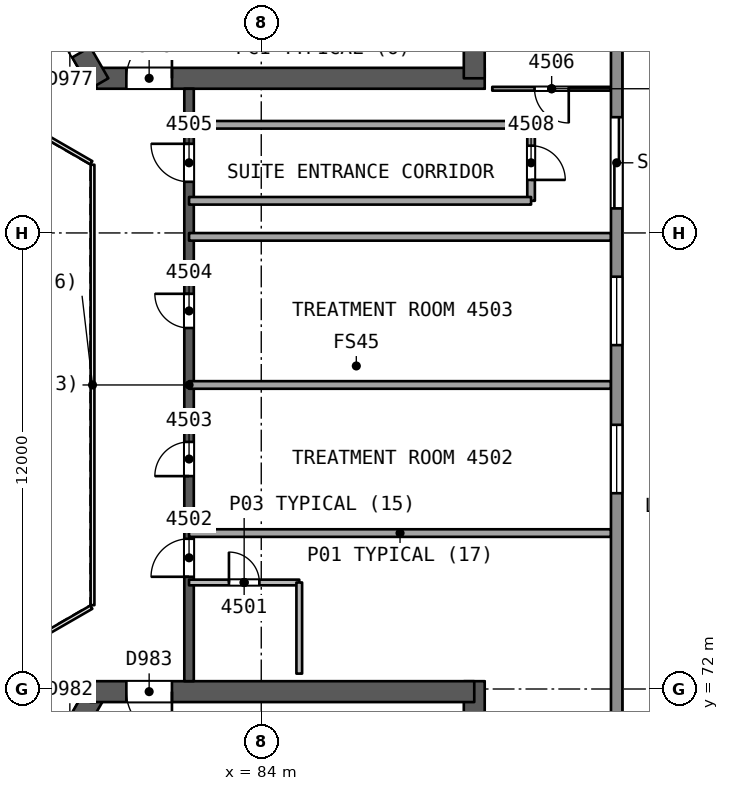
"""IFC4 building model, lengths in metres.
Left out: names, types, materials, properties, quantities, classifications, styles, units other than length and angle.
Written with IfcOpenShell. Run it as: python <this file> out.ifc"""

import sys

from ifc_helpers import new_model, si_unit, direction, frame, frame_2d, origin, place, context, subcontext, project, spatial, rectangle, extrude, element, fill, save


model = new_model("IFC4")
c1 = context("Model", 3, precision=1e-05, world=origin(), true_north=direction((0.0, 1.0)))
c2 = subcontext(c1, "Body", "Model", "MODEL_VIEW")
j1 = project(units=[si_unit("LENGTHUNIT", "METRE"), si_unit("PLANEANGLEUNIT", "RADIAN")], contexts=[c1])
p1 = place(None, origin())
s1 = spatial("IfcSite", under=j1, at=p1, CompositionType="ELEMENT")
p2 = place(p1, origin())
s2 = spatial("IfcBuilding", under=s1, at=p2, CompositionType="ELEMENT")
p3 = place(p2, frame((0.0, 0.0, 185.9)))
s3 = spatial("IfcBuildingStorey", under=s2, at=p3, CompositionType="ELEMENT", Elevation=185.9)
p4 = place(p3, frame((79.659, 88.069, 0.0), z_axis=(0.0, 0.0, 1.0), x_axis=(1.0, 0.0, 0.0)))
e1 = element("IfcWall", 1, at=p4, inside=s3, PredefinedType="SHEAR", context=c2, shape_type="SweptSolid", body=[
    extrude(rectangle(XDim=10.221, YDim=0.55, at=frame_2d((5.111, 0.0))), origin(), (0.0, 0.0, 1.0), 3.7),
])
p5 = place(p4, frame((0.791, 0.0, 0.0)))
e2 = element("IfcOpeningElement", 2, at=p5, cuts=e1, PredefinedType="OPENING", context=c2, shape_type="SweptSolid", body=[
    extrude(rectangle(XDim=1.2, YDim=2.1, at=frame_2d((0.6, 1.05))), frame((0.0, 0.286, 0.0), z_axis=(0.0, -1.0, 0.0), x_axis=(1.0, 0.0, 0.0)), (0.0, 0.0, 1.0), 0.571),
])
p6 = place(p3, frame((89.605, 88.069, 0.0), z_axis=(0.0, 0.0, 1.0), x_axis=(0.0, 1.0, 0.0)))
e3 = element("IfcWall", 3, at=p6, inside=s3, PredefinedType="SHEAR", context=c2, shape_type="SweptSolid", body=[
    extrude(rectangle(XDim=14.058, YDim=0.55, at=frame_2d((7.029, 0.0))), origin(), (0.0, 0.0, 1.0), 3.7),
])
p7 = place(p3, frame((74.686, 96.683, 0.0), z_axis=(0.0, 0.0, 1.0), x_axis=(0.499997818338, -0.866026663364, 0.0)))
e4 = element("IfcWall", 4, at=p7, inside=s3, PredefinedType="SHEAR", context=c2, shape_type="SweptSolid", body=[
    extrude(rectangle(XDim=10.105, YDim=0.55, at=frame_2d((5.052, 0.0))), origin(), (0.0, 0.0, 1.0), 3.7),
])
p8 = place(p7, frame((7.955, 0.0, 0.0)))
e5 = element("IfcOpeningElement", 5, at=p8, cuts=e4, PredefinedType="OPENING", context=c2, shape_type="SweptSolid", body=[
    extrude(rectangle(XDim=1.2, YDim=2.1, at=frame_2d((0.6, 1.05))), frame((0.0, 0.286, 0.0), z_axis=(0.0, -1.0, 0.0), x_axis=(1.0, 0.0, 0.0)), (0.0, 0.0, 1.0), 0.571),
])
p9 = place(p3, frame((79.659, 71.931, 0.0), z_axis=(0.0, 0.0, 1.0), x_axis=(-0.500000202252, -0.866025287014, 0.0)))
e6 = element("IfcWall", 6, at=p9, inside=s3, PredefinedType="SHEAR", context=c2, shape_type="SweptSolid", body=[
    extrude(rectangle(XDim=10.221, YDim=0.55, at=frame_2d((5.111, 0.0))), origin(), (0.0, 0.0, 1.0), 3.7),
])
p10 = place(p9, frame((0.791, 0.0, 0.0)))
e7 = element("IfcOpeningElement", 7, at=p10, cuts=e6, PredefinedType="OPENING", context=c2, shape_type="SweptSolid", body=[
    extrude(rectangle(XDim=1.2, YDim=2.1, at=frame_2d((0.6, 1.05))), frame((0.0, 0.286, 0.0), z_axis=(0.0, -1.0, 0.0), x_axis=(1.0, 0.0, 0.0)), (0.0, 0.0, 1.0), 0.571),
])
p11 = place(p3, frame((89.605, 58.031, 0.0), z_axis=(0.0, 0.0, 1.0), x_axis=(0.0, 1.0, 0.0)))
e8 = element("IfcWall", 8, at=p11, inside=s3, PredefinedType="SHEAR", context=c2, shape_type="SweptSolid", body=[
    extrude(rectangle(XDim=14.175, YDim=0.55, at=frame_2d((7.087, 0.0))), origin(), (0.0, 0.0, 1.0), 3.7),
])
p12 = place(p3, frame((89.605, 71.931, 0.0), z_axis=(0.0, 0.0, 1.0), x_axis=(-1.0, 0.0, 0.0)))
e9 = element("IfcWall", 9, at=p12, inside=s3, PredefinedType="SHEAR", context=c2, shape_type="SweptSolid", body=[
    extrude(rectangle(XDim=10.105, YDim=0.55, at=frame_2d((5.052, 0.0))), origin(), (0.0, 0.0, 1.0), 3.7),
])
p13 = place(p12, frame((7.955, 0.0, 0.0)))
e10 = element("IfcOpeningElement", 10, at=p13, cuts=e9, PredefinedType="OPENING", context=c2, shape_type="SweptSolid", body=[
    extrude(rectangle(XDim=1.2, YDim=2.1, at=frame_2d((0.6, 1.05))), frame((0.0, 0.286, 0.0), z_axis=(0.0, -1.0, 0.0), x_axis=(1.0, 0.0, 0.0)), (0.0, 0.0, 1.0), 0.571),
])
p14 = place(p3, frame((82.1, 72.206, 0.0), z_axis=(0.0, 0.0, 1.0), x_axis=(0.0, 1.0, 0.0)))
e11 = element("IfcWall", 11, at=p14, inside=s3, PredefinedType="SHEAR", context=c2, shape_type="SweptSolid", body=[
    extrude(rectangle(XDim=15.588, YDim=0.25, at=frame_2d((7.794, 0.0))), origin(), (0.0, 0.0, 1.0), 3.25),
])
p15 = place(p14, frame((2.747, 0.0, 0.0)))
e12 = element("IfcOpeningElement", 12, at=p15, cuts=e11, PredefinedType="OPENING", context=c2, shape_type="SweptSolid", body=[
    extrude(rectangle(XDim=1.0, YDim=2.1, at=frame_2d((0.5, 1.05))), frame((0.0, 0.135, 0.0), z_axis=(0.0, -1.0, 0.0), x_axis=(1.0, 0.0, 0.0)), (0.0, 0.0, 1.0), 0.271),
])
p16 = place(p14, frame((5.396, 0.0, 0.0)))
e13 = element("IfcOpeningElement", 13, at=p16, cuts=e11, PredefinedType="OPENING", context=c2, shape_type="SweptSolid", body=[
    extrude(rectangle(XDim=0.9, YDim=2.1, at=frame_2d((0.45, 1.05))), frame((0.0, 0.135, 0.0), z_axis=(0.0, -1.0, 0.0), x_axis=(1.0, 0.0, 0.0)), (0.0, 0.0, 1.0), 0.271),
])
p17 = place(p14, frame((9.293, 0.0, 0.0)))
e14 = element("IfcOpeningElement", 14, at=p17, cuts=e11, PredefinedType="OPENING", context=c2, shape_type="SweptSolid", body=[
    extrude(rectangle(XDim=0.9, YDim=2.1, at=frame_2d((0.45, 1.05))), frame((0.0, 0.135, 0.0), z_axis=(0.0, -1.0, 0.0), x_axis=(1.0, 0.0, 0.0)), (0.0, 0.0, 1.0), 0.271),
])
p18 = place(p14, frame((13.14, 0.0, 0.0)))
e15 = element("IfcOpeningElement", 15, at=p18, cuts=e11, PredefinedType="OPENING", context=c2, shape_type="SweptSolid", body=[
    extrude(rectangle(XDim=1.0, YDim=2.1, at=frame_2d((0.5, 1.05))), frame((0.0, 0.135, 0.0), z_axis=(0.0, -1.0, 0.0), x_axis=(1.0, 0.0, 0.0)), (0.0, 0.0, 1.0), 0.271),
])
p19 = place(p3, frame((82.1, 74.803, 0.0), z_axis=(0.0, 0.0, 1.0), x_axis=(1.0, 0.0, 0.0)))
e16 = element("IfcWall", 16, at=p19, inside=s3, PredefinedType="PARTITIONING", context=c2, shape_type="SweptSolid", body=[
    extrude(rectangle(XDim=2.9, YDim=0.15, at=frame_2d((1.45, 0.0))), origin(), (0.0, 0.0, 1.0), 3.25),
])
p20 = place(p19, frame((1.05, 0.0, 0.0)))
e17 = element("IfcOpeningElement", 17, at=p20, cuts=e16, PredefinedType="OPENING", context=c2, shape_type="SweptSolid", body=[
    extrude(rectangle(XDim=0.8, YDim=2.1, at=frame_2d((0.4, 1.05))), frame((0.0, 0.085, 0.0), z_axis=(0.0, -1.0, 0.0), x_axis=(1.0, 0.0, 0.0)), (0.0, 0.0, 1.0), 0.171),
])
p21 = place(p3, frame((85.0, 74.803, 0.0), z_axis=(0.0, 0.0, 1.0), x_axis=(0.0, -1.0, 0.0)))
e18 = element("IfcWall", 18, at=p21, inside=s3, PredefinedType="PARTITIONING", context=c2, shape_type="SweptSolid", body=[
    extrude(rectangle(XDim=2.398, YDim=0.15, at=frame_2d((1.199, 0.0))), origin(), (0.0, 0.0, 1.0), 3.25),
])
for number, where, z_axis, x_axis in (
    (19, (93.204, 76.103, 0.0), (0.0, 0.0, 1.0), (-1.0, 0.0, 0.0)),
    (20, (93.204, 80.0, 0.0), (0.0, 0.0, 1.0), (-1.0, 0.0, 0.0)),
    (21, (93.204, 83.897, 0.0), (0.0, 0.0, 1.0), (-1.0, 0.0, 0.0)),
):
    element("IfcWall", number, at=place(p3, frame(where, z_axis=z_axis, x_axis=x_axis)), inside=s3, PredefinedType="PARTITIONING", context=c2, shape_type="SweptSolid", body=[
        extrude(rectangle(XDim=11.104, YDim=0.2, at=frame_2d((5.552, 0.0))), origin(), (0.0, 0.0, 1.0), 3.25),
    ])
p22 = place(p3, frame((93.204, 87.794, 0.0), z_axis=(0.0, 0.0, 1.0), x_axis=(-1.0, 0.0, 0.0)))
e22 = element("IfcWall", 22, at=p22, inside=s3, PredefinedType="PARTITIONING", context=c2, shape_type="SweptSolid", body=[
    extrude(rectangle(XDim=3.125, YDim=0.1, at=frame_2d((1.562, 0.0))), origin(), (0.0, 0.0, 1.0), 3.25),
])
p23 = place(p22, frame((1.112, 0.0, 0.0)))
e23 = element("IfcOpeningElement", 23, at=p23, cuts=e22, PredefinedType="OPENING", context=c2, shape_type="SweptSolid", body=[
    extrude(rectangle(XDim=0.9, YDim=2.1, at=frame_2d((0.45, 1.05))), frame((0.0, 0.061, 0.0), z_axis=(0.0, -1.0, 0.0), x_axis=(1.0, 0.0, 0.0)), (0.0, 0.0, 1.0), 0.121),
])
p24 = place(p3, frame((82.1, 86.846, 0.0), z_axis=(0.0, 0.0, 1.0), x_axis=(1.0, 0.0, 0.0)))
e24 = element("IfcWall", 24, at=p24, inside=s3, PredefinedType="PARTITIONING", context=c2, shape_type="SweptSolid", body=[
    extrude(rectangle(XDim=9.0, YDim=0.2, at=frame_2d((4.5, 0.0))), origin(), (0.0, 0.0, 1.0), 3.25),
])
p25 = place(p3, frame((91.1, 86.846, 0.0), z_axis=(0.0, 0.0, 1.0), x_axis=(0.0, -1.0, 0.0)))
e25 = element("IfcWall", 25, at=p25, inside=s3, PredefinedType="PARTITIONING", context=c2, shape_type="SweptSolid", body=[
    extrude(rectangle(XDim=2.0, YDim=0.2, at=frame_2d((1.0, 0.0))), origin(), (0.0, 0.0, 1.0), 3.25),
])
p26 = place(p25, frame((0.55, 0.0, 0.0)))
e26 = element("IfcOpeningElement", 26, at=p26, cuts=e25, PredefinedType="OPENING", context=c2, shape_type="SweptSolid", body=[
    extrude(rectangle(XDim=0.9, YDim=2.1, at=frame_2d((0.45, 1.05))), frame((0.0, 0.11, 0.0), z_axis=(0.0, -1.0, 0.0), x_axis=(1.0, 0.0, 0.0)), (0.0, 0.0, 1.0), 0.221),
])
p27 = place(p3, frame((91.1, 84.846, 0.0), z_axis=(0.0, 0.0, 1.0), x_axis=(-1.0, 0.0, 0.0)))
e27 = element("IfcWall", 27, at=p27, inside=s3, PredefinedType="PARTITIONING", context=c2, shape_type="SweptSolid", body=[
    extrude(rectangle(XDim=9.0, YDim=0.2, at=frame_2d((4.5, 0.0))), origin(), (0.0, 0.0, 1.0), 3.25),
])
p28 = place(p3, frame((93.353, 106.388, 0.0), z_axis=(0.0, 0.0, 1.0), x_axis=(0.0, -1.0, 0.0)))
e28 = element("IfcWall", 28, at=p28, inside=s3, PredefinedType="SOLIDWALL", context=c2, shape_type="SweptSolid", body=[
    extrude(rectangle(XDim=52.776, YDim=0.3, at=frame_2d((26.388, 0.0))), origin(), (0.0, 0.0, 1.0), 3.25),
])
p29 = place(p28, frame((19.343, 0.0, 0.0)))
e29 = element("IfcOpeningElement", 29, at=p29, cuts=e28, PredefinedType="OPENING", context=c2, shape_type="SweptSolid", body=[
    extrude(rectangle(XDim=2.4, YDim=2.4, at=frame_2d((1.2, 1.2))), frame((0.0, 0.161, 0.0), z_axis=(0.0, -1.0, 0.0), x_axis=(1.0, 0.0, 0.0)), (0.0, 0.0, 1.0), 0.321),
])
p30 = place(p28, frame((9.385, 0.0, 0.0)))
e30 = element("IfcOpeningElement", 30, at=p30, cuts=e28, PredefinedType="OPENING", context=c2, shape_type="SweptSolid", body=[
    extrude(rectangle(XDim=2.4, YDim=2.4, at=frame_2d((1.2, 1.2))), frame((0.0, 0.161, 0.0), z_axis=(0.0, -1.0, 0.0), x_axis=(1.0, 0.0, 0.0)), (0.0, 0.0, 1.0), 0.321),
])
p31 = place(p28, frame((40.374, 0.0, 0.0)))
e31 = element("IfcOpeningElement", 31, at=p31, cuts=e28, PredefinedType="OPENING", context=c2, shape_type="SweptSolid", body=[
    extrude(rectangle(XDim=2.4, YDim=2.4, at=frame_2d((1.2, 1.2))), frame((0.0, 0.161, 0.0), z_axis=(0.0, -1.0, 0.0), x_axis=(1.0, 0.0, 0.0)), (0.0, 0.0, 1.0), 0.321),
])
p32 = place(p28, frame((27.437, 0.0, 0.9)))
e32 = element("IfcOpeningElement", 32, at=p32, cuts=e28, PredefinedType="OPENING", context=c2, shape_type="SweptSolid", body=[
    extrude(rectangle(XDim=1.8, YDim=1.5, at=frame_2d((0.9, 0.75))), frame((0.0, 0.161, 0.0), z_axis=(0.0, -1.0, 0.0), x_axis=(1.0, 0.0, 0.0)), (0.0, 0.0, 1.0), 0.321),
])
p33 = place(p28, frame((23.54, 0.0, 0.9)))
e33 = element("IfcOpeningElement", 33, at=p33, cuts=e28, PredefinedType="OPENING", context=c2, shape_type="SweptSolid", body=[
    extrude(rectangle(XDim=1.8, YDim=1.5, at=frame_2d((0.9, 0.75))), frame((0.0, 0.161, 0.0), z_axis=(0.0, -1.0, 0.0), x_axis=(1.0, 0.0, 0.0)), (0.0, 0.0, 1.0), 0.321),
])
p34 = place(p3, frame((42.971, 82.7, 0.0), z_axis=(0.0, 0.0, 1.0), x_axis=(0.866024890781, 0.500000888547, 0.0)))
e34 = element("IfcWall", 34, at=p34, inside=s3, PredefinedType="SOLIDWALL", context=c2, shape_type="SweptSolid", body=[
    extrude(rectangle(XDim=52.776, YDim=0.3, at=frame_2d((26.388, 0.0))), origin(), (0.0, 0.0, 1.0), 3.25),
])
p35 = place(p34, frame((20.511, 0.0, 0.0)))
e35 = element("IfcOpeningElement", 35, at=p35, cuts=e34, PredefinedType="OPENING", context=c2, shape_type="SweptSolid", body=[
    extrude(rectangle(XDim=2.4, YDim=2.4, at=frame_2d((1.2, 1.2))), frame((0.0, 0.161, 0.0), z_axis=(0.0, -1.0, 0.0), x_axis=(1.0, 0.0, 0.0)), (0.0, 0.0, 1.0), 0.321),
])
p36 = place(p34, frame((9.385, 0.0, 0.0)))
e36 = element("IfcOpeningElement", 36, at=p36, cuts=e34, PredefinedType="OPENING", context=c2, shape_type="SweptSolid", body=[
    extrude(rectangle(XDim=2.4, YDim=2.4, at=frame_2d((1.2, 1.2))), frame((0.0, 0.161, 0.0), z_axis=(0.0, -1.0, 0.0), x_axis=(1.0, 0.0, 0.0)), (0.0, 0.0, 1.0), 0.321),
])
p37 = place(p34, frame((39.984, 0.0, 0.0)))
e37 = element("IfcOpeningElement", 37, at=p37, cuts=e34, PredefinedType="OPENING", context=c2, shape_type="SweptSolid", body=[
    extrude(rectangle(XDim=2.4, YDim=2.4, at=frame_2d((1.2, 1.2))), frame((0.0, 0.161, 0.0), z_axis=(0.0, -1.0, 0.0), x_axis=(1.0, 0.0, 0.0)), (0.0, 0.0, 1.0), 0.321),
])
p38 = place(p34, frame((26.268, 0.0, 0.9)))
e38 = element("IfcOpeningElement", 38, at=p38, cuts=e34, PredefinedType="OPENING", context=c2, shape_type="SweptSolid", body=[
    extrude(rectangle(XDim=1.8, YDim=1.5, at=frame_2d((0.9, 0.75))), frame((0.0, 0.161, 0.0), z_axis=(0.0, -1.0, 0.0), x_axis=(1.0, 0.0, 0.0)), (0.0, 0.0, 1.0), 0.321),
])
p39 = place(p3, frame((88.677, 50.912, 0.0), z_axis=(0.0, 0.0, 1.0), x_axis=(-0.866024890781, 0.500000888547, 0.0)))
e39 = element("IfcWall", 39, at=p39, inside=s3, PredefinedType="SOLIDWALL", context=c2, shape_type="SweptSolid", body=[
    extrude(rectangle(XDim=52.776, YDim=0.3, at=frame_2d((26.388, 0.0))), origin(), (0.0, 0.0, 1.0), 3.25),
])
p40 = place(p39, frame((18.953, 0.0, 0.0)))
e40 = element("IfcOpeningElement", 40, at=p40, cuts=e39, PredefinedType="OPENING", context=c2, shape_type="SweptSolid", body=[
    extrude(rectangle(XDim=2.4, YDim=2.4, at=frame_2d((1.2, 1.2))), frame((0.0, 0.161, 0.0), z_axis=(0.0, -1.0, 0.0), x_axis=(1.0, 0.0, 0.0)), (0.0, 0.0, 1.0), 0.321),
])
p41 = place(p39, frame((9.385, 0.0, 0.0)))
e41 = element("IfcOpeningElement", 41, at=p41, cuts=e39, PredefinedType="OPENING", context=c2, shape_type="SweptSolid", body=[
    extrude(rectangle(XDim=2.4, YDim=2.4, at=frame_2d((1.2, 1.2))), frame((0.0, 0.161, 0.0), z_axis=(0.0, -1.0, 0.0), x_axis=(1.0, 0.0, 0.0)), (0.0, 0.0, 1.0), 0.321),
])
p42 = place(p39, frame((39.984, 0.0, 0.0)))
e42 = element("IfcOpeningElement", 42, at=p42, cuts=e39, PredefinedType="OPENING", context=c2, shape_type="SweptSolid", body=[
    extrude(rectangle(XDim=2.4, YDim=2.4, at=frame_2d((1.2, 1.2))), frame((0.0, 0.161, 0.0), z_axis=(0.0, -1.0, 0.0), x_axis=(1.0, 0.0, 0.0)), (0.0, 0.0, 1.0), 0.321),
])
p43 = place(p39, frame((26.657, 0.0, 0.9)))
e43 = element("IfcOpeningElement", 43, at=p43, cuts=e39, PredefinedType="OPENING", context=c2, shape_type="SweptSolid", body=[
    extrude(rectangle(XDim=1.8, YDim=1.5, at=frame_2d((0.9, 0.75))), frame((0.0, 0.161, 0.0), z_axis=(0.0, -1.0, 0.0), x_axis=(1.0, 0.0, 0.0)), (0.0, 0.0, 1.0), 0.321),
])
p44 = place(p39, frame((22.76, 0.0, 0.9)))
e44 = element("IfcOpeningElement", 44, at=p44, cuts=e39, PredefinedType="OPENING", context=c2, shape_type="SweptSolid", body=[
    extrude(rectangle(XDim=1.8, YDim=1.5, at=frame_2d((0.9, 0.75))), frame((0.0, 0.161, 0.0), z_axis=(0.0, -1.0, 0.0), x_axis=(1.0, 0.0, 0.0)), (0.0, 0.0, 1.0), 0.321),
])
p45 = place(p3, frame((79.56, 74.206, 0.0), z_axis=(0.0, 0.0, 1.0), x_axis=(0.0, 1.0, 0.0)))
e45 = element("IfcWall", 45, at=p45, inside=s3, PredefinedType="PARTITIONING", context=c2, shape_type="SweptSolid", body=[
    extrude(rectangle(XDim=11.588, YDim=0.1, at=frame_2d((5.794, 0.0))), origin(), (0.0, 0.0, 1.0), 3.25),
])
for number, where, z_axis, x_axis in (
    (46, (79.53, 85.846, 0.0), (0.0, 0.0, 1.0), (-0.866, 0.5, 0.0)),
    (47, (77.798, 73.154, 0.0), (0.0, 0.0, 1.0), (0.866, 0.5, 0.0)),
):
    element("IfcWall", number, at=place(p3, frame(where, z_axis=z_axis, x_axis=x_axis)), inside=s3, PredefinedType="PARTITIONING", context=c2, shape_type="SweptSolid", body=[
        extrude(rectangle(XDim=2.0, YDim=0.1, at=frame_2d((1.0, 0.0))), origin(), (0.0, 0.0, 1.0), 3.25),
    ])
p46 = place(p20, origin())
e48 = element("IfcDoor", 48, at=p46, inside=s3, OperationType="SINGLE_SWING_LEFT", PredefinedType="NOTDEFINED", context=c2, shape_type="SweptSolid", body=[
    extrude(rectangle(XDim=0.8, YDim=2.1, at=frame_2d((0.4, 1.05))), frame((0.0, 0.025, 0.0), z_axis=(0.0, -1.0, 0.0), x_axis=(1.0, 0.0, 0.0)), (0.0, 0.0, 1.0), 0.05),
])
fill(e17, e48)
p47 = place(p15, origin())
e49 = element("IfcDoor", 49, at=p47, inside=s3, OperationType="SINGLE_SWING_LEFT", PredefinedType="NOTDEFINED", context=c2, shape_type="SweptSolid", body=[
    extrude(rectangle(XDim=1.0, YDim=2.1, at=frame_2d((0.5, 1.05))), frame((0.0, 0.025, 0.0), z_axis=(0.0, -1.0, 0.0), x_axis=(1.0, 0.0, 0.0)), (0.0, 0.0, 1.0), 0.05),
])
fill(e12, e49)
p48 = place(p16, origin())
e50 = element("IfcDoor", 50, at=p48, inside=s3, OperationType="SINGLE_SWING_LEFT", PredefinedType="NOTDEFINED", context=c2, shape_type="SweptSolid", body=[
    extrude(rectangle(XDim=0.9, YDim=2.1, at=frame_2d((0.45, 1.05))), frame((0.0, 0.025, 0.0), z_axis=(0.0, -1.0, 0.0), x_axis=(1.0, 0.0, 0.0)), (0.0, 0.0, 1.0), 0.05),
])
fill(e13, e50)
p49 = place(p17, origin())
e51 = element("IfcDoor", 51, at=p49, inside=s3, OperationType="SINGLE_SWING_RIGHT", PredefinedType="NOTDEFINED", context=c2, shape_type="SweptSolid", body=[
    extrude(rectangle(XDim=0.9, YDim=2.1, at=frame_2d((0.45, 1.05))), frame((0.0, 0.025, 0.0), z_axis=(0.0, -1.0, 0.0), x_axis=(1.0, 0.0, 0.0)), (0.0, 0.0, 1.0), 0.05),
])
fill(e14, e51)
p50 = place(p18, origin())
e52 = element("IfcDoor", 52, at=p50, inside=s3, OperationType="SINGLE_SWING_RIGHT", PredefinedType="NOTDEFINED", context=c2, shape_type="SweptSolid", body=[
    extrude(rectangle(XDim=1.0, YDim=2.1, at=frame_2d((0.5, 1.05))), frame((0.0, 0.025, 0.0), z_axis=(0.0, -1.0, 0.0), x_axis=(1.0, 0.0, 0.0)), (0.0, 0.0, 1.0), 0.05),
])
fill(e15, e52)
p51 = place(p23, origin())
e53 = element("IfcDoor", 53, at=p51, inside=s3, OperationType="SINGLE_SWING_LEFT", PredefinedType="NOTDEFINED", context=c2, shape_type="SweptSolid", body=[
    extrude(rectangle(XDim=0.9, YDim=2.1, at=frame_2d((0.45, 1.05))), frame((0.0, 0.025, 0.0), z_axis=(0.0, -1.0, 0.0), x_axis=(1.0, 0.0, 0.0)), (0.0, 0.0, 1.0), 0.05),
])
fill(e23, e53)
p52 = place(p26, origin())
e54 = element("IfcDoor", 54, at=p52, inside=s3, OperationType="SINGLE_SWING_RIGHT", PredefinedType="NOTDEFINED", context=c2, shape_type="SweptSolid", body=[
    extrude(rectangle(XDim=0.9, YDim=2.1, at=frame_2d((0.45, 1.05))), frame((0.0, 0.025, 0.0), z_axis=(0.0, -1.0, 0.0), x_axis=(1.0, 0.0, 0.0)), (0.0, 0.0, 1.0), 0.05),
])
fill(e26, e54)
p53 = place(p29, origin())
e55 = element("IfcDoor", 55, at=p53, inside=s3, OperationType="SLIDING_TO_LEFT", PredefinedType="NOTDEFINED", context=c2, shape_type="SweptSolid", body=[
    extrude(rectangle(XDim=2.4, YDim=2.4, at=frame_2d((1.2, 1.2))), frame((0.0, 0.025, 0.0), z_axis=(0.0, -1.0, 0.0), x_axis=(1.0, 0.0, 0.0)), (0.0, 0.0, 1.0), 0.05),
])
fill(e29, e55)
p54 = place(p32, origin())
e56 = element("IfcWindow", 56, at=p54, inside=s3, PartitioningType="SINGLE_PANEL", PredefinedType="WINDOW", context=c2, shape_type="SweptSolid", body=[
    extrude(rectangle(XDim=1.8, YDim=1.5, at=frame_2d((0.9, 0.75))), frame((0.0, 0.03, 0.0), z_axis=(0.0, -1.0, 0.0), x_axis=(1.0, 0.0, 0.0)), (0.0, 0.0, 1.0), 0.06),
])
fill(e32, e56)
p55 = place(p33, origin())
e57 = element("IfcWindow", 57, at=p55, inside=s3, PartitioningType="SINGLE_PANEL", PredefinedType="WINDOW", context=c2, shape_type="SweptSolid", body=[
    extrude(rectangle(XDim=1.8, YDim=1.5, at=frame_2d((0.9, 0.75))), frame((0.0, 0.03, 0.0), z_axis=(0.0, -1.0, 0.0), x_axis=(1.0, 0.0, 0.0)), (0.0, 0.0, 1.0), 0.06),
])
fill(e33, e57)
p56 = place(p5, origin())
e58 = element("IfcDoor", 58, at=p56, inside=s3, OperationType="SINGLE_SWING_RIGHT", PredefinedType="NOTDEFINED", context=c2, shape_type="SweptSolid", body=[
    extrude(rectangle(XDim=1.2, YDim=2.1, at=frame_2d((0.6, 1.05))), frame((0.0, 0.025, 0.0), z_axis=(0.0, -1.0, 0.0), x_axis=(1.0, 0.0, 0.0)), (0.0, 0.0, 1.0), 0.05),
])
fill(e2, e58)
p57 = place(p8, origin())
e59 = element("IfcDoor", 59, at=p57, inside=s3, OperationType="SINGLE_SWING_LEFT", PredefinedType="NOTDEFINED", context=c2, shape_type="SweptSolid", body=[
    extrude(rectangle(XDim=1.2, YDim=2.1, at=frame_2d((0.6, 1.05))), frame((0.0, 0.025, 0.0), z_axis=(0.0, -1.0, 0.0), x_axis=(1.0, 0.0, 0.0)), (0.0, 0.0, 1.0), 0.05),
])
fill(e5, e59)
p58 = place(p13, origin())
e60 = element("IfcDoor", 60, at=p58, inside=s3, OperationType="SINGLE_SWING_LEFT", PredefinedType="NOTDEFINED", context=c2, shape_type="SweptSolid", body=[
    extrude(rectangle(XDim=1.2, YDim=2.1, at=frame_2d((0.6, 1.05))), frame((0.0, 0.025, 0.0), z_axis=(0.0, -1.0, 0.0), x_axis=(1.0, 0.0, 0.0)), (0.0, 0.0, 1.0), 0.05),
])
fill(e10, e60)
save(model, sys.argv[1])
